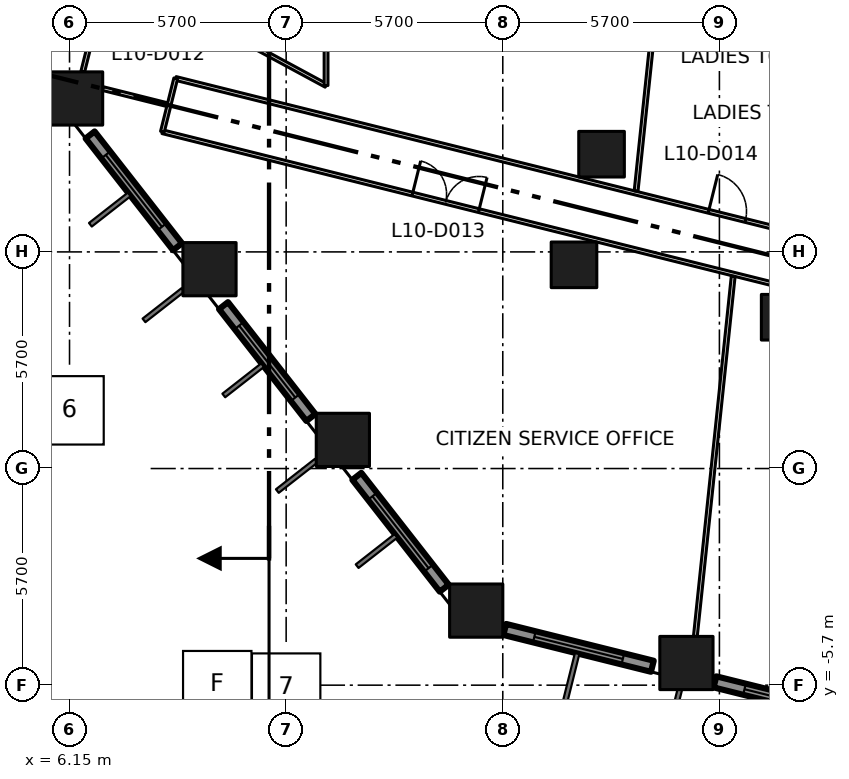
"""IFC4 building model, lengths in metres.
Left out: names, types, materials, properties, quantities, classifications, styles, units other than length and angle.
Written with IfcOpenShell. Run it as: python <this file> out.ifc"""

import sys

from ifc_helpers import new_model, si_unit, direction, frame, frame_2d, origin, origin_2d, place, context, subcontext, project, spatial, rectangle, extrude, element, fill, save


model = new_model("IFC4")
c1 = context("Model", 3, precision=1e-05, world=origin(), true_north=direction((0.0, 1.0)))
c2 = subcontext(c1, "Body", "Model", "MODEL_VIEW")
j1 = project(units=[si_unit("LENGTHUNIT", "METRE"), si_unit("PLANEANGLEUNIT", "RADIAN")], contexts=[c1])
p1 = place(None, origin())
s1 = spatial("IfcSite", under=j1, at=p1, CompositionType="ELEMENT")
p2 = place(p1, origin())
s2 = spatial("IfcBuilding", under=s1, at=p2, CompositionType="ELEMENT")
p3 = place(p2, frame((0.0, 0.0, 49.8)))
s3 = spatial("IfcBuildingStorey", under=s2, at=p3, CompositionType="ELEMENT", Elevation=49.8)
for number, where, z_axis, x_axis in (
    (1, (16.851, -3.738, 0.0), (0.0, 0.0, 1.0), (1.0, 0.0, 0.0)),
    (2, (13.342, 0.754, 0.0), (0.0, 0.0, 1.0), (1.0, 0.0, 0.0)),
    (3, (9.833, 5.245, 0.0), (0.0, 0.0, 1.0), (1.0, 0.0, 0.0)),
    (4, (6.323, 9.737, 0.0), (0.0, 0.0, 1.0), (1.0, 0.0, 0.0)),
    (5, (22.382, -5.117, 0.0), (0.0, 0.0, 1.0), (1.0, 0.0, 0.0)),
):
    element("IfcColumn", number, at=place(p3, frame(where, z_axis=z_axis, x_axis=x_axis)), inside=s3, PredefinedType="COLUMN", context=c2, shape_type="SweptSolid", body=[
        extrude(rectangle(XDim=1.4, YDim=1.4, at=origin_2d()), origin(), (0.0, 0.0, 1.0), 4.2),
    ])
for number, where, z_axis, x_axis in (
    (6, (19.424, 5.36, 0.0), (0.0, 0.0, 1.0), (1.0, 0.0, 0.0)),
    (7, (24.954, 3.981, 0.0), (0.0, 0.0, 1.0), (1.0, 0.0, 0.0)),
    (8, (20.149, 8.271, 0.0), (0.0, 0.0, 1.0), (1.0, 0.0, 0.0)),
):
    element("IfcColumn", number, at=place(p3, frame(where, z_axis=z_axis, x_axis=x_axis)), inside=s3, PredefinedType="COLUMN", context=c2, shape_type="SweptSolid", body=[
        extrude(rectangle(XDim=1.2, YDim=1.2, at=origin_2d()), origin(), (0.0, 0.0, 1.0), 4.2),
    ])
p4 = place(p3, frame((6.692, 8.778, 0.0), z_axis=(0.0, 0.0, 1.0), x_axis=(0.615767067156, -0.787928244833, 0.0)))
e9 = element("IfcWall", 9, at=p4, inside=s3, PredefinedType="SOLIDWALL", context=c2, shape_type="SweptSolid", body=[
    extrude(rectangle(XDim=3.735, YDim=0.3, at=frame_2d((1.868, 0.0))), origin(), (0.0, 0.0, 1.0), 3.1),
])
p5 = place(p4, frame((0.668, 0.0, 0.8)))
e10 = element("IfcOpeningElement", 10, at=p5, cuts=e9, PredefinedType="OPENING", context=c2, shape_type="SweptSolid", body=[
    extrude(rectangle(XDim=2.4, YDim=2.1, at=frame_2d((1.2, 1.05))), frame((0.0, 0.16, 0.0), z_axis=(0.0, -1.0, 0.0), x_axis=(1.0, 0.0, 0.0)), (0.0, 0.0, 1.0), 0.32),
])
p6 = place(p3, frame((10.202, 4.286, 0.0), z_axis=(0.0, 0.0, 1.0), x_axis=(0.615636430057, -0.788030320474, 0.0)))
e11 = element("IfcWall", 11, at=p6, inside=s3, PredefinedType="SOLIDWALL", context=c2, shape_type="SweptSolid", body=[
    extrude(rectangle(XDim=3.734, YDim=0.3, at=frame_2d((1.867, 0.0))), origin(), (0.0, 0.0, 1.0), 3.1),
])
p7 = place(p6, frame((0.667, 0.0, 0.8)))
e12 = element("IfcOpeningElement", 12, at=p7, cuts=e11, PredefinedType="OPENING", context=c2, shape_type="SweptSolid", body=[
    extrude(rectangle(XDim=2.4, YDim=2.1, at=frame_2d((1.2, 1.05))), frame((0.0, 0.16, 0.0), z_axis=(0.0, -1.0, 0.0), x_axis=(1.0, 0.0, 0.0)), (0.0, 0.0, 1.0), 0.32),
])
p8 = place(p3, frame((13.71, -0.205, 0.0), z_axis=(0.0, 0.0, 1.0), x_axis=(0.615798780214, -0.787903460004, 0.0)))
e13 = element("IfcWall", 13, at=p8, inside=s3, PredefinedType="SOLIDWALL", context=c2, shape_type="SweptSolid", body=[
    extrude(rectangle(XDim=3.735, YDim=0.3, at=frame_2d((1.868, 0.0))), origin(), (0.0, 0.0, 1.0), 3.1),
])
p9 = place(p8, frame((0.667, 0.0, 0.8)))
e14 = element("IfcOpeningElement", 14, at=p9, cuts=e13, PredefinedType="OPENING", context=c2, shape_type="SweptSolid", body=[
    extrude(rectangle(XDim=2.4, YDim=2.1, at=frame_2d((1.2, 1.05))), frame((0.0, 0.16, 0.0), z_axis=(0.0, -1.0, 0.0), x_axis=(1.0, 0.0, 0.0)), (0.0, 0.0, 1.0), 0.32),
])
p10 = place(p3, frame((17.602, -4.234, 0.0), z_axis=(0.0, 0.0, 1.0), x_axis=(0.970260773365, -0.242062040951, 0.0)))
e15 = element("IfcWall", 15, at=p10, inside=s3, PredefinedType="SOLIDWALL", context=c2, shape_type="SweptSolid", body=[
    extrude(rectangle(XDim=4.003, YDim=0.3, at=frame_2d((2.001, 0.0))), origin(), (0.0, 0.0, 1.0), 3.1),
])
p11 = place(p10, frame((0.802, 0.0, 0.8)))
e16 = element("IfcOpeningElement", 16, at=p11, cuts=e15, PredefinedType="OPENING", context=c2, shape_type="SweptSolid", body=[
    extrude(rectangle(XDim=2.4, YDim=2.1, at=frame_2d((1.2, 1.05))), frame((0.0, 0.16, 0.0), z_axis=(0.0, -1.0, 0.0), x_axis=(1.0, 0.0, 0.0)), (0.0, 0.0, 1.0), 0.32),
])
p12 = place(p3, frame((23.133, -5.613, 0.0), z_axis=(0.0, 0.0, 1.0), x_axis=(0.970303772127, -0.241889623168, 0.0)))
e17 = element("IfcWall", 17, at=p12, inside=s3, PredefinedType="SOLIDWALL", context=c2, shape_type="SweptSolid", body=[
    extrude(rectangle(XDim=4.002, YDim=0.3, at=frame_2d((2.001, 0.0))), origin(), (0.0, 0.0, 1.0), 3.1),
])
p13 = place(p12, frame((0.801, 0.0, 0.8)))
e18 = element("IfcOpeningElement", 18, at=p13, cuts=e17, PredefinedType="OPENING", context=c2, shape_type="SweptSolid", body=[
    extrude(rectangle(XDim=2.4, YDim=2.1, at=frame_2d((1.2, 1.05))), frame((0.0, 0.16, 0.0), z_axis=(0.0, -1.0, 0.0), x_axis=(1.0, 0.0, 0.0)), (0.0, 0.0, 1.0), 0.32),
])
p14 = place(p3, frame((8.594, 8.862, 0.0), z_axis=(0.0, 0.0, 1.0), x_axis=(0.970292243361, -0.241935864379, 0.0)))
e19 = element("IfcWall", 19, at=p14, inside=s3, PredefinedType="PARTITIONING", context=c2, shape_type="SweptSolid", body=[
    extrude(rectangle(XDim=68.775, YDim=0.1, at=frame_2d((34.388, 0.0))), origin(), (0.0, 0.0, 1.0), 3.9),
])
p15 = place(p14, frame((36.265, 0.0, 0.0)))
e20 = element("IfcOpeningElement", 20, at=p15, cuts=e19, PredefinedType="OPENING", context=c2, shape_type="SweptSolid", body=[
    extrude(rectangle(XDim=1.8, YDim=2.1, at=frame_2d((0.9, 1.05))), frame((0.0, 0.06, 0.0), z_axis=(0.0, -1.0, 0.0), x_axis=(1.0, 0.0, 0.0)), (0.0, 0.0, 1.0), 0.12),
])
p16 = place(p14, frame((48.365, 0.0, 0.0)))
e21 = element("IfcOpeningElement", 21, at=p16, cuts=e19, PredefinedType="OPENING", context=c2, shape_type="SweptSolid", body=[
    extrude(rectangle(XDim=1.8, YDim=2.1, at=frame_2d((0.9, 1.05))), frame((0.0, 0.06, 0.0), z_axis=(0.0, -1.0, 0.0), x_axis=(1.0, 0.0, 0.0)), (0.0, 0.0, 1.0), 0.12),
])
p17 = place(p14, frame((19.565, 0.0, 0.0)))
e22 = element("IfcOpeningElement", 22, at=p17, cuts=e19, PredefinedType="OPENING", context=c2, shape_type="SweptSolid", body=[
    extrude(rectangle(XDim=1.0, YDim=2.1, at=frame_2d((0.5, 1.05))), frame((0.0, 0.06, 0.0), z_axis=(0.0, -1.0, 0.0), x_axis=(1.0, 0.0, 0.0)), (0.0, 0.0, 1.0), 0.12),
])
p18 = place(p14, frame((24.165, 0.0, 0.0)))
e23 = element("IfcOpeningElement", 23, at=p18, cuts=e19, PredefinedType="OPENING", context=c2, shape_type="SweptSolid", body=[
    extrude(rectangle(XDim=1.8, YDim=2.1, at=frame_2d((0.9, 1.05))), frame((0.0, 0.06, 0.0), z_axis=(0.0, -1.0, 0.0), x_axis=(1.0, 0.0, 0.0)), (0.0, 0.0, 1.0), 0.12),
])
p19 = place(p14, frame((6.78, 0.0, 0.0)))
e24 = element("IfcOpeningElement", 24, at=p19, cuts=e19, PredefinedType="OPENING", context=c2, shape_type="SweptSolid", body=[
    extrude(rectangle(XDim=1.8, YDim=2.1, at=frame_2d((0.9, 1.05))), frame((0.0, 0.06, 0.0), z_axis=(0.0, -1.0, 0.0), x_axis=(1.0, 0.0, 0.0)), (0.0, 0.0, 1.0), 0.12),
])
p20 = place(p3, frame((8.944, 10.264, 0.0), z_axis=(0.0, 0.0, 1.0), x_axis=(0.970300504447, -0.241902730595, 0.0)))
e25 = element("IfcWall", 25, at=p20, inside=s3, PredefinedType="PARTITIONING", context=c2, shape_type="SweptSolid", body=[
    extrude(rectangle(XDim=19.879, YDim=0.1, at=frame_2d((9.939, 0.0))), origin(), (0.0, 0.0, 1.0), 3.9),
])
p21 = place(p20, frame((14.45, 0.0, 0.0)))
e26 = element("IfcOpeningElement", 26, at=p21, cuts=e25, PredefinedType="OPENING", context=c2, shape_type="SweptSolid", body=[
    extrude(rectangle(XDim=1.0, YDim=2.1, at=frame_2d((0.5, 1.05))), frame((0.0, 0.06, 0.0), z_axis=(0.0, -1.0, 0.0), x_axis=(1.0, 0.0, 0.0)), (0.0, 0.0, 1.0), 0.12),
])
p22 = place(p3, frame((8.944, 10.264, 0.0), z_axis=(0.0, 0.0, 1.0), x_axis=(-0.242297077633, -0.970202105837, 0.0)))
e27 = element("IfcWall", 27, at=p22, inside=s3, PredefinedType="PARTITIONING", context=c2, shape_type="SweptSolid", body=[
    extrude(rectangle(XDim=1.445, YDim=0.1, at=frame_2d((0.722, 0.0))), origin(), (0.0, 0.0, 1.0), 3.9),
])
p23 = place(p3, frame((9.9, 11.7, 0.0), z_axis=(0.0, 0.0, 1.0), x_axis=(0.87965147249, -0.475618846291, 0.0)))
e28 = element("IfcWall", 28, at=p23, inside=s3, PredefinedType="PARTITIONING", context=c2, shape_type="SweptSolid", body=[
    extrude(rectangle(XDim=3.41, YDim=0.1, at=frame_2d((1.705, 0.0))), origin(), (0.0, 0.0, 1.0), 3.9),
])
p24 = place(p3, frame((12.9, 10.078, 0.0), z_axis=(0.0, 0.0, 1.0), x_axis=(0.0, 1.0, 0.0)))
e29 = element("IfcWall", 29, at=p24, inside=s3, PredefinedType="PARTITIONING", context=c2, shape_type="SweptSolid", body=[
    extrude(rectangle(XDim=4.022, YDim=0.1, at=frame_2d((2.011, 0.0))), origin(), (0.0, 0.0, 1.0), 3.9),
])
p25 = place(p3, frame((6.797, 11.638, 0.0), z_axis=(0.0, 0.0, 1.0), x_axis=(-0.242396400943, -0.970177295555, 0.0)))
e30 = element("IfcWall", 30, at=p25, inside=s3, PredefinedType="PARTITIONING", context=c2, shape_type="SweptSolid", body=[
    extrude(rectangle(XDim=1.238, YDim=0.1, at=frame_2d((0.619, 0.0))), origin(), (0.0, 0.0, 1.0), 3.9),
])
p26 = place(p3, frame((8.72, 9.574, 0.0), z_axis=(0.0, 0.0, 1.0), x_axis=(-0.97016712555, 0.242437102155, 0.0)))
e31 = element("IfcWall", 31, at=p26, inside=s3, PredefinedType="PARTITIONING", context=c2, shape_type="SweptSolid", body=[
    extrude(rectangle(XDim=1.749, YDim=0.1, at=frame_2d((0.875, 0.0))), origin(), (0.0, 0.0, 1.0), 3.9),
])
p27 = place(p3, frame((21.058, 7.302, 0.0), z_axis=(0.0, 0.0, 1.0), x_axis=(0.10457695042, 0.994516797968, 0.0)))
e32 = element("IfcWall", 32, at=p27, inside=s3, PredefinedType="PARTITIONING", context=c2, shape_type="SweptSolid", body=[
    extrude(rectangle(XDim=6.836, YDim=0.1, at=frame_2d((3.418, 0.0))), origin(), (0.0, 0.0, 1.0), 3.9),
])
p28 = place(p3, frame((22.617, -4.417, 0.0), z_axis=(0.0, 0.0, 1.0), x_axis=(0.10455139139, 0.994519485258, 0.0)))
e33 = element("IfcWall", 33, at=p28, inside=s3, PredefinedType="PARTITIONING", context=c2, shape_type="SweptSolid", body=[
    extrude(rectangle(XDim=9.527, YDim=0.1, at=frame_2d((4.764, 0.0))), origin(), (0.0, 0.0, 1.0), 3.9),
])
p29 = place(p5, origin())
e34 = element("IfcWindow", 34, at=p29, inside=s3, PartitioningType="DOUBLE_PANEL_VERTICAL", PredefinedType="WINDOW", context=c2, shape_type="SweptSolid", body=[
    extrude(rectangle(XDim=2.4, YDim=2.1, at=frame_2d((1.2, 1.05))), frame((0.0, 0.03, 0.0), z_axis=(0.0, -1.0, 0.0), x_axis=(1.0, 0.0, 0.0)), (0.0, 0.0, 1.0), 0.06),
])
fill(e10, e34)
p30 = place(p7, origin())
e35 = element("IfcWindow", 35, at=p30, inside=s3, PartitioningType="DOUBLE_PANEL_VERTICAL", PredefinedType="WINDOW", context=c2, shape_type="SweptSolid", body=[
    extrude(rectangle(XDim=2.4, YDim=2.1, at=frame_2d((1.2, 1.05))), frame((0.0, 0.03, 0.0), z_axis=(0.0, -1.0, 0.0), x_axis=(1.0, 0.0, 0.0)), (0.0, 0.0, 1.0), 0.06),
])
fill(e12, e35)
p31 = place(p9, origin())
e36 = element("IfcWindow", 36, at=p31, inside=s3, PartitioningType="DOUBLE_PANEL_VERTICAL", PredefinedType="WINDOW", context=c2, shape_type="SweptSolid", body=[
    extrude(rectangle(XDim=2.4, YDim=2.1, at=frame_2d((1.2, 1.05))), frame((0.0, 0.03, 0.0), z_axis=(0.0, -1.0, 0.0), x_axis=(1.0, 0.0, 0.0)), (0.0, 0.0, 1.0), 0.06),
])
fill(e14, e36)
p32 = place(p11, origin())
e37 = element("IfcWindow", 37, at=p32, inside=s3, PartitioningType="DOUBLE_PANEL_VERTICAL", PredefinedType="WINDOW", context=c2, shape_type="SweptSolid", body=[
    extrude(rectangle(XDim=2.4, YDim=2.1, at=frame_2d((1.2, 1.05))), frame((0.0, 0.03, 0.0), z_axis=(0.0, -1.0, 0.0), x_axis=(1.0, 0.0, 0.0)), (0.0, 0.0, 1.0), 0.06),
])
fill(e16, e37)
p33 = place(p13, origin())
e38 = element("IfcWindow", 38, at=p33, inside=s3, PartitioningType="DOUBLE_PANEL_VERTICAL", PredefinedType="WINDOW", context=c2, shape_type="SweptSolid", body=[
    extrude(rectangle(XDim=2.4, YDim=2.1, at=frame_2d((1.2, 1.05))), frame((0.0, 0.03, 0.0), z_axis=(0.0, -1.0, 0.0), x_axis=(1.0, 0.0, 0.0)), (0.0, 0.0, 1.0), 0.06),
])
fill(e18, e38)
p34 = place(p19, origin())
e39 = element("IfcDoor", 39, at=p34, inside=s3, OperationType="DOUBLE_DOOR_SINGLE_SWING", PredefinedType="DOOR", context=c2, shape_type="SweptSolid", body=[
    extrude(rectangle(XDim=1.8, YDim=2.1, at=frame_2d((0.9, 1.05))), frame((0.0, 0.025, 0.0), z_axis=(0.0, -1.0, 0.0), x_axis=(1.0, 0.0, 0.0)), (0.0, 0.0, 1.0), 0.05),
])
fill(e24, e39)
p35 = place(p21, origin())
e40 = element("IfcDoor", 40, at=p35, inside=s3, OperationType="SINGLE_SWING_LEFT", PredefinedType="DOOR", context=c2, shape_type="SweptSolid", body=[
    extrude(rectangle(XDim=1.0, YDim=2.1, at=frame_2d((0.5, 1.05))), frame((0.0, 0.025, 0.0), z_axis=(0.0, -1.0, 0.0), x_axis=(1.0, 0.0, 0.0)), (0.0, 0.0, 1.0), 0.05),
])
fill(e26, e40)
save(model, sys.argv[1])
